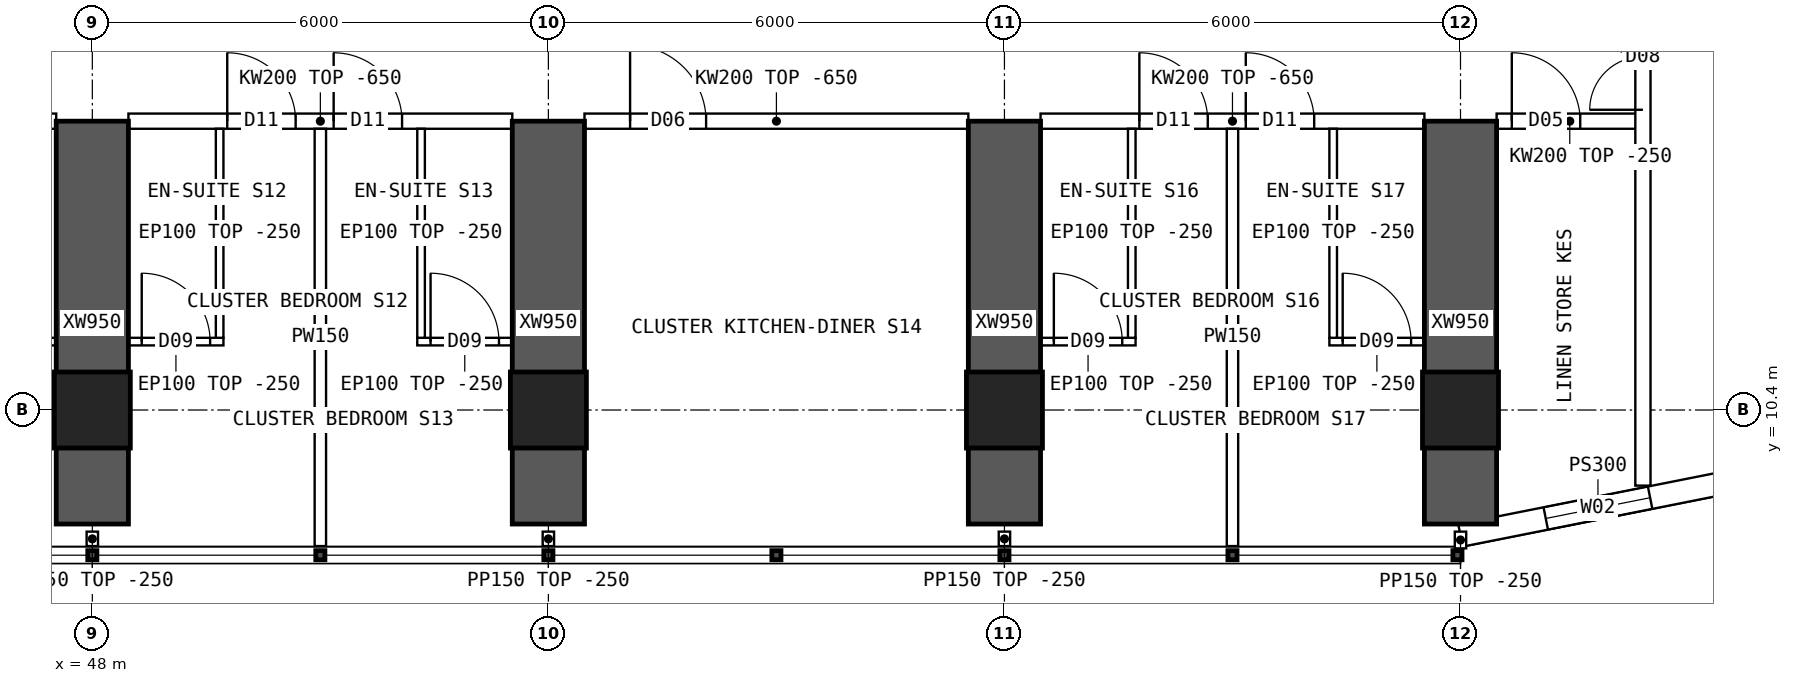
"""IFC4 building model, lengths in metres.
Left out: names, types, materials, properties, quantities, classifications, styles, units other than length and angle.
Written with IfcOpenShell. Run it as: python <this file> out.ifc"""

import sys

from ifc_helpers import new_model, si_unit, direction, frame, frame_2d, origin, origin_2d, place, context, subcontext, project, spatial, polyline, rectangle, hollow_rectangle, outline, extrude, element, fill, save


model = new_model("IFC4")
c1 = context("Model", 3, precision=1e-05, world=origin(), true_north=direction((0.0, 1.0)))
c2 = subcontext(c1, "Body", "Model", "MODEL_VIEW")
j1 = project(units=[si_unit("LENGTHUNIT", "METRE"), si_unit("PLANEANGLEUNIT", "RADIAN")], contexts=[c1])
p1 = place(None, origin())
s1 = spatial("IfcSite", under=j1, at=p1, CompositionType="ELEMENT")
p2 = place(p1, origin())
s2 = spatial("IfcBuilding", under=s1, at=p2, CompositionType="ELEMENT")
p3 = place(p2, frame((0.0, 0.0, 103.15)))
s3 = spatial("IfcBuildingStorey", under=s2, at=p3, CompositionType="ELEMENT", Elevation=103.15)
for number, where, z_axis, x_axis in (
    (1, (48.0, 10.4, 0.0), (0.0, 0.0, 1.0), (1.0, 0.0, 0.0)),
    (2, (54.0, 10.4, 0.0), (0.0, 0.0, 1.0), (1.0, 0.0, 0.0)),
    (3, (60.0, 10.4, 0.0), (0.0, 0.0, 1.0), (1.0, 0.0, 0.0)),
    (4, (66.0, 10.4, 0.0), (0.0, 0.0, 1.0), (1.0, 0.0, 0.0)),
):
    element("IfcColumn", number, at=place(p3, frame(where, z_axis=z_axis, x_axis=x_axis)), inside=s3, PredefinedType="COLUMN", context=c2, shape_type="SweptSolid", body=[
        extrude(hollow_rectangle(XDim=1.0, YDim=1.0, WallThickness=0.1, at=origin_2d()), origin(), (0.0, 0.0, 1.0), 3.75),
    ])
for number, where, z_axis, x_axis in (
    (5, (48.0, 8.9, 0.0), (0.0, 0.0, 1.0), (0.0, 1.0, 0.0)),
    (6, (54.0, 8.9, 0.0), (0.0, 0.0, 1.0), (0.0, 1.0, 0.0)),
    (7, (60.0, 8.9, 0.0), (0.0, 0.0, 1.0), (0.0, 1.0, 0.0)),
    (8, (66.0, 8.9, 0.0), (0.0, 0.0, 1.0), (0.0, 1.0, 0.0)),
):
    element("IfcWall", number, at=place(p3, frame(where, z_axis=z_axis, x_axis=x_axis)), inside=s3, PredefinedType="SHEAR", context=c2, shape_type="SweptSolid", body=[
        extrude(rectangle(XDim=5.3, YDim=0.95, at=frame_2d((2.65, 0.0))), origin(), (0.0, 0.0, 1.0), 3.75),
    ])
p4 = place(p3, frame((66.0, 8.75, 0.0), z_axis=(0.0, 0.0, 1.0), x_axis=(0.980791473772, 0.195059183267, 0.0)))
e9 = element("IfcWall", 9, at=p4, inside=s3, PredefinedType="SOLIDWALL", context=c2, shape_type="SweptSolid", body=[
    extrude(outline(polyline([(-0.03, -0.15), (3.717, -0.15), (3.657, 0.15), (0.03, 0.15), (-0.03, -0.15)])), origin(), (0.0, 0.0, 1.0), 3.5),
])
p5 = place(p4, frame((1.144, 0.0, 0.9)))
e10 = element("IfcOpeningElement", 10, at=p5, cuts=e9, PredefinedType="OPENING", context=c2, shape_type="SweptSolid", body=[
    extrude(rectangle(XDim=1.4, YDim=1.8, at=frame_2d((0.7, 0.9))), frame((0.0, 0.16, 0.0), z_axis=(0.0, -1.0, 0.0), x_axis=(1.0, 0.0, 0.0)), (0.0, 0.0, 1.0), 0.32),
])
p6 = place(p3, frame((42.475, 14.2, 0.0), z_axis=(0.0, 0.0, 1.0), x_axis=(1.0, 0.0, 0.0)))
e11 = element("IfcWall", 11, at=p6, inside=s3, PredefinedType="SOLIDWALL", context=c2, shape_type="SweptSolid", body=[
    extrude(outline(polyline([(0.0, 0.0), (5.05, 0.0), (5.05, 3.1), (0.0, 3.1), (0.0, 0.0)])), frame((0.0, 0.1, 0.0), z_axis=(0.0, -1.0, 0.0), x_axis=(1.0, 0.0, 0.0)), (0.0, 0.0, 1.0), 0.2),
])
p7 = place(p6, frame((1.3, 0.0, 0.0)))
e12 = element("IfcOpeningElement", 12, at=p7, cuts=e11, PredefinedType="OPENING", context=c2, shape_type="SweptSolid", body=[
    extrude(rectangle(XDim=0.9, YDim=2.1, at=frame_2d((0.45, 1.05))), frame((0.0, 0.11, 0.0), z_axis=(0.0, -1.0, 0.0), x_axis=(1.0, 0.0, 0.0)), (0.0, 0.0, 1.0), 0.22),
])
p8 = place(p6, frame((2.7, 0.0, 0.0)))
e13 = element("IfcOpeningElement", 13, at=p8, cuts=e11, PredefinedType="OPENING", context=c2, shape_type="SweptSolid", body=[
    extrude(rectangle(XDim=0.9, YDim=2.1, at=frame_2d((0.45, 1.05))), frame((0.0, 0.11, 0.0), z_axis=(0.0, -1.0, 0.0), x_axis=(1.0, 0.0, 0.0)), (0.0, 0.0, 1.0), 0.22),
])
p9 = place(p3, frame((48.475, 14.2, 0.0), z_axis=(0.0, 0.0, 1.0), x_axis=(1.0, 0.0, 0.0)))
e14 = element("IfcWall", 14, at=p9, inside=s3, PredefinedType="SOLIDWALL", context=c2, shape_type="SweptSolid", body=[
    extrude(outline(polyline([(0.0, 0.0), (5.05, 0.0), (5.05, 3.1), (0.0, 3.1), (0.0, 0.0)])), frame((0.0, 0.1, 0.0), z_axis=(0.0, -1.0, 0.0), x_axis=(1.0, 0.0, 0.0)), (0.0, 0.0, 1.0), 0.2),
])
p10 = place(p9, frame((1.3, 0.0, 0.0)))
e15 = element("IfcOpeningElement", 15, at=p10, cuts=e14, PredefinedType="OPENING", context=c2, shape_type="SweptSolid", body=[
    extrude(rectangle(XDim=0.9, YDim=2.1, at=frame_2d((0.45, 1.05))), frame((0.0, 0.11, 0.0), z_axis=(0.0, -1.0, 0.0), x_axis=(1.0, 0.0, 0.0)), (0.0, 0.0, 1.0), 0.22),
])
p11 = place(p9, frame((2.7, 0.0, 0.0)))
e16 = element("IfcOpeningElement", 16, at=p11, cuts=e14, PredefinedType="OPENING", context=c2, shape_type="SweptSolid", body=[
    extrude(rectangle(XDim=0.9, YDim=2.1, at=frame_2d((0.45, 1.05))), frame((0.0, 0.11, 0.0), z_axis=(0.0, -1.0, 0.0), x_axis=(1.0, 0.0, 0.0)), (0.0, 0.0, 1.0), 0.22),
])
p12 = place(p3, frame((54.475, 14.2, 0.0), z_axis=(0.0, 0.0, 1.0), x_axis=(1.0, 0.0, 0.0)))
e17 = element("IfcWall", 17, at=p12, inside=s3, PredefinedType="SOLIDWALL", context=c2, shape_type="SweptSolid", body=[
    extrude(outline(polyline([(0.0, 0.0), (5.05, 0.0), (5.05, 3.1), (0.0, 3.1), (0.0, 0.0)])), frame((0.0, 0.1, 0.0), z_axis=(0.0, -1.0, 0.0), x_axis=(1.0, 0.0, 0.0)), (0.0, 0.0, 1.0), 0.2),
])
p13 = place(p12, frame((0.6, 0.0, 0.0)))
e18 = element("IfcOpeningElement", 18, at=p13, cuts=e17, PredefinedType="OPENING", context=c2, shape_type="SweptSolid", body=[
    extrude(rectangle(XDim=1.0, YDim=2.1, at=frame_2d((0.5, 1.05))), frame((0.0, 0.11, 0.0), z_axis=(0.0, -1.0, 0.0), x_axis=(1.0, 0.0, 0.0)), (0.0, 0.0, 1.0), 0.22),
])
p14 = place(p3, frame((60.475, 14.2, 0.0), z_axis=(0.0, 0.0, 1.0), x_axis=(1.0, 0.0, 0.0)))
e19 = element("IfcWall", 19, at=p14, inside=s3, PredefinedType="SOLIDWALL", context=c2, shape_type="SweptSolid", body=[
    extrude(outline(polyline([(0.0, 0.0), (5.05, 0.0), (5.05, 3.1), (0.0, 3.1), (0.0, 0.0)])), frame((0.0, 0.1, 0.0), z_axis=(0.0, -1.0, 0.0), x_axis=(1.0, 0.0, 0.0)), (0.0, 0.0, 1.0), 0.2),
])
p15 = place(p14, frame((1.3, 0.0, 0.0)))
e20 = element("IfcOpeningElement", 20, at=p15, cuts=e19, PredefinedType="OPENING", context=c2, shape_type="SweptSolid", body=[
    extrude(rectangle(XDim=0.9, YDim=2.1, at=frame_2d((0.45, 1.05))), frame((0.0, 0.11, 0.0), z_axis=(0.0, -1.0, 0.0), x_axis=(1.0, 0.0, 0.0)), (0.0, 0.0, 1.0), 0.22),
])
p16 = place(p14, frame((2.7, 0.0, 0.0)))
e21 = element("IfcOpeningElement", 21, at=p16, cuts=e19, PredefinedType="OPENING", context=c2, shape_type="SweptSolid", body=[
    extrude(rectangle(XDim=0.9, YDim=2.1, at=frame_2d((0.45, 1.05))), frame((0.0, 0.11, 0.0), z_axis=(0.0, -1.0, 0.0), x_axis=(1.0, 0.0, 0.0)), (0.0, 0.0, 1.0), 0.22),
])
p17 = place(p3, frame((66.475, 14.2, 0.0), z_axis=(0.0, 0.0, 1.0), x_axis=(1.0, 0.0, 0.0)))
e22 = element("IfcWall", 22, at=p17, inside=s3, PredefinedType="SOLIDWALL", context=c2, shape_type="SweptSolid", body=[
    extrude(rectangle(XDim=1.925, YDim=0.2, at=frame_2d((0.962, 0.0))), origin(), (0.0, 0.0, 1.0), 3.5),
])
p18 = place(p17, frame((0.2, 0.0, 0.0)))
e23 = element("IfcOpeningElement", 23, at=p18, cuts=e22, PredefinedType="OPENING", context=c2, shape_type="SweptSolid", body=[
    extrude(rectangle(XDim=0.9, YDim=2.1, at=frame_2d((0.45, 1.05))), frame((0.0, 0.11, 0.0), z_axis=(0.0, -1.0, 0.0), x_axis=(1.0, 0.0, 0.0)), (0.0, 0.0, 1.0), 0.22),
])
p19 = place(p3, frame((47.525, 11.3, 0.0), z_axis=(0.0, 0.0, 1.0), x_axis=(-1.0, 0.0, 0.0)))
e24 = element("IfcWall", 24, at=p19, inside=s3, PredefinedType="PARTITIONING", context=c2, shape_type="SweptSolid", body=[
    extrude(rectangle(XDim=1.25, YDim=0.1, at=frame_2d((0.625, 0.0))), origin(), (0.0, 0.0, 1.0), 3.5),
])
p20 = place(p19, frame((0.175, 0.0, 0.0)))
e25 = element("IfcOpeningElement", 25, at=p20, cuts=e24, PredefinedType="OPENING", context=c2, shape_type="SweptSolid", body=[
    extrude(rectangle(XDim=0.9, YDim=2.1, at=frame_2d((0.45, 1.05))), frame((0.0, 0.06, 0.0), z_axis=(0.0, -1.0, 0.0), x_axis=(1.0, 0.0, 0.0)), (0.0, 0.0, 1.0), 0.12),
])
p21 = place(p3, frame((51.0, 8.61, 0.0), z_axis=(0.0, 0.0, 1.0), x_axis=(0.0, 1.0, 0.0)))
e26 = element("IfcWall", 26, at=p21, inside=s3, PredefinedType="PARTITIONING", context=c2, shape_type="SweptSolid", body=[
    extrude(outline(polyline([(0.0, 0.0), (5.49, 0.0), (5.49, 3.1), (5.442, 3.1), (5.44, 3.5), (1.992, 3.5), (1.99, 3.1), (1.592, 3.1), (1.59, 3.5), (0.0, 3.5), (0.0, 0.0)])), frame((0.0, 0.075, 0.0), z_axis=(0.0, -1.0, 0.0), x_axis=(1.0, 0.0, 0.0)), (0.0, 0.0, 1.0), 0.15),
])
p22 = place(p3, frame((49.725, 11.3, 0.0), z_axis=(0.0, 0.0, 1.0), x_axis=(-1.0, 0.0, 0.0)))
e27 = element("IfcWall", 27, at=p22, inside=s3, PredefinedType="PARTITIONING", context=c2, shape_type="SweptSolid", body=[
    extrude(rectangle(XDim=1.25, YDim=0.1, at=frame_2d((0.625, 0.0))), origin(), (0.0, 0.0, 1.0), 3.5),
])
p23 = place(p22, frame((0.175, 0.0, 0.0)))
e28 = element("IfcOpeningElement", 28, at=p23, cuts=e27, PredefinedType="OPENING", context=c2, shape_type="SweptSolid", body=[
    extrude(rectangle(XDim=0.9, YDim=2.1, at=frame_2d((0.45, 1.05))), frame((0.0, 0.06, 0.0), z_axis=(0.0, -1.0, 0.0), x_axis=(1.0, 0.0, 0.0)), (0.0, 0.0, 1.0), 0.12),
])
p24 = place(p3, frame((49.675, 11.35, 0.0), z_axis=(0.0, 0.0, 1.0), x_axis=(0.0, 1.0, 0.0)))
e29 = element("IfcWall", 29, at=p24, inside=s3, PredefinedType="PARTITIONING", context=c2, shape_type="SweptSolid", body=[
    extrude(outline(polyline([(0.0, 0.0), (2.75, 0.0), (2.75, 3.1), (2.702, 3.1), (2.7, 3.5), (0.0, 3.5), (0.0, 0.0)])), frame((0.0, 0.05, 0.0), z_axis=(0.0, -1.0, 0.0), x_axis=(1.0, 0.0, 0.0)), (0.0, 0.0, 1.0), 0.1),
])
p25 = place(p3, frame((53.525, 11.3, 0.0), z_axis=(0.0, 0.0, 1.0), x_axis=(-1.0, 0.0, 0.0)))
e30 = element("IfcWall", 30, at=p25, inside=s3, PredefinedType="PARTITIONING", context=c2, shape_type="SweptSolid", body=[
    extrude(rectangle(XDim=1.25, YDim=0.1, at=frame_2d((0.625, 0.0))), origin(), (0.0, 0.0, 1.0), 3.5),
])
p26 = place(p25, frame((0.175, 0.0, 0.0)))
e31 = element("IfcOpeningElement", 31, at=p26, cuts=e30, PredefinedType="OPENING", context=c2, shape_type="SweptSolid", body=[
    extrude(rectangle(XDim=0.9, YDim=2.1, at=frame_2d((0.45, 1.05))), frame((0.0, 0.06, 0.0), z_axis=(0.0, -1.0, 0.0), x_axis=(1.0, 0.0, 0.0)), (0.0, 0.0, 1.0), 0.12),
])
p27 = place(p3, frame((52.325, 11.35, 0.0), z_axis=(0.0, 0.0, 1.0), x_axis=(0.0, 1.0, 0.0)))
e32 = element("IfcWall", 32, at=p27, inside=s3, PredefinedType="PARTITIONING", context=c2, shape_type="SweptSolid", body=[
    extrude(outline(polyline([(0.0, 0.0), (2.75, 0.0), (2.75, 3.1), (2.702, 3.1), (2.7, 3.5), (0.0, 3.5), (0.0, 0.0)])), frame((0.0, 0.05, 0.0), z_axis=(0.0, -1.0, 0.0), x_axis=(1.0, 0.0, 0.0)), (0.0, 0.0, 1.0), 0.1),
])
p28 = place(p3, frame((63.0, 8.61, 0.0), z_axis=(0.0, 0.0, 1.0), x_axis=(0.0, 1.0, 0.0)))
e33 = element("IfcWall", 33, at=p28, inside=s3, PredefinedType="PARTITIONING", context=c2, shape_type="SweptSolid", body=[
    extrude(outline(polyline([(0.0, 0.0), (5.49, 0.0), (5.49, 3.1), (5.442, 3.1), (5.44, 3.5), (1.992, 3.5), (1.99, 3.1), (1.592, 3.1), (1.59, 3.5), (0.0, 3.5), (0.0, 0.0)])), frame((0.0, 0.075, 0.0), z_axis=(0.0, -1.0, 0.0), x_axis=(1.0, 0.0, 0.0)), (0.0, 0.0, 1.0), 0.15),
])
p29 = place(p3, frame((61.725, 11.3, 0.0), z_axis=(0.0, 0.0, 1.0), x_axis=(-1.0, 0.0, 0.0)))
e34 = element("IfcWall", 34, at=p29, inside=s3, PredefinedType="PARTITIONING", context=c2, shape_type="SweptSolid", body=[
    extrude(rectangle(XDim=1.25, YDim=0.1, at=frame_2d((0.625, 0.0))), origin(), (0.0, 0.0, 1.0), 3.5),
])
p30 = place(p29, frame((0.175, 0.0, 0.0)))
e35 = element("IfcOpeningElement", 35, at=p30, cuts=e34, PredefinedType="OPENING", context=c2, shape_type="SweptSolid", body=[
    extrude(rectangle(XDim=0.9, YDim=2.1, at=frame_2d((0.45, 1.05))), frame((0.0, 0.06, 0.0), z_axis=(0.0, -1.0, 0.0), x_axis=(1.0, 0.0, 0.0)), (0.0, 0.0, 1.0), 0.12),
])
p31 = place(p3, frame((61.675, 11.35, 0.0), z_axis=(0.0, 0.0, 1.0), x_axis=(0.0, 1.0, 0.0)))
e36 = element("IfcWall", 36, at=p31, inside=s3, PredefinedType="PARTITIONING", context=c2, shape_type="SweptSolid", body=[
    extrude(outline(polyline([(0.0, 0.0), (2.75, 0.0), (2.75, 3.1), (2.702, 3.1), (2.7, 3.5), (0.0, 3.5), (0.0, 0.0)])), frame((0.0, 0.05, 0.0), z_axis=(0.0, -1.0, 0.0), x_axis=(1.0, 0.0, 0.0)), (0.0, 0.0, 1.0), 0.1),
])
p32 = place(p3, frame((65.525, 11.3, 0.0), z_axis=(0.0, 0.0, 1.0), x_axis=(-1.0, 0.0, 0.0)))
e37 = element("IfcWall", 37, at=p32, inside=s3, PredefinedType="PARTITIONING", context=c2, shape_type="SweptSolid", body=[
    extrude(rectangle(XDim=1.25, YDim=0.1, at=frame_2d((0.625, 0.0))), origin(), (0.0, 0.0, 1.0), 3.5),
])
p33 = place(p32, frame((0.175, 0.0, 0.0)))
e38 = element("IfcOpeningElement", 38, at=p33, cuts=e37, PredefinedType="OPENING", context=c2, shape_type="SweptSolid", body=[
    extrude(rectangle(XDim=0.9, YDim=2.1, at=frame_2d((0.45, 1.05))), frame((0.0, 0.06, 0.0), z_axis=(0.0, -1.0, 0.0), x_axis=(1.0, 0.0, 0.0)), (0.0, 0.0, 1.0), 0.12),
])
p34 = place(p3, frame((64.325, 11.35, 0.0), z_axis=(0.0, 0.0, 1.0), x_axis=(0.0, 1.0, 0.0)))
e39 = element("IfcWall", 39, at=p34, inside=s3, PredefinedType="PARTITIONING", context=c2, shape_type="SweptSolid", body=[
    extrude(outline(polyline([(0.0, 0.0), (2.75, 0.0), (2.75, 3.1), (2.702, 3.1), (2.7, 3.5), (0.0, 3.5), (0.0, 0.0)])), frame((0.0, 0.05, 0.0), z_axis=(0.0, -1.0, 0.0), x_axis=(1.0, 0.0, 0.0)), (0.0, 0.0, 1.0), 0.1),
])
p35 = place(p3, frame((68.4, 9.405, 0.0), z_axis=(0.0, 0.0, 1.0), x_axis=(0.0, 1.0, 0.0)))
e40 = element("IfcWall", 40, at=p35, inside=s3, PredefinedType="SOLIDWALL", context=c2, shape_type="SweptSolid", body=[
    extrude(rectangle(XDim=45.189, YDim=0.2, at=frame_2d((22.595, 0.0))), origin(), (0.0, 0.0, 1.0), 3.5),
])
p36 = place(p35, frame((25.595, 0.0, 0.0)))
e41 = element("IfcOpeningElement", 41, at=p36, cuts=e40, PredefinedType="OPENING", context=c2, shape_type="SweptSolid", body=[
    extrude(rectangle(XDim=1.2, YDim=2.1, at=frame_2d((0.6, 1.05))), frame((0.0, 0.11, 0.0), z_axis=(0.0, -1.0, 0.0), x_axis=(1.0, 0.0, 0.0)), (0.0, 0.0, 1.0), 0.22),
])
p37 = place(p35, frame((4.945, 0.0, 0.0)))
e42 = element("IfcOpeningElement", 42, at=p37, cuts=e40, PredefinedType="OPENING", context=c2, shape_type="SweptSolid", body=[
    extrude(rectangle(XDim=1.4, YDim=2.1, at=frame_2d((0.7, 1.05))), frame((0.0, 0.11, 0.0), z_axis=(0.0, -1.0, 0.0), x_axis=(1.0, 0.0, 0.0)), (0.0, 0.0, 1.0), 0.22),
])
p38 = place(p35, frame((38.745, 0.0, 0.0)))
e43 = element("IfcOpeningElement", 43, at=p38, cuts=e40, PredefinedType="OPENING", context=c2, shape_type="SweptSolid", body=[
    extrude(rectangle(XDim=1.4, YDim=2.1, at=frame_2d((0.7, 1.05))), frame((0.0, 0.11, 0.0), z_axis=(0.0, -1.0, 0.0), x_axis=(1.0, 0.0, 0.0)), (0.0, 0.0, 1.0), 0.22),
])
for number, where, z_axis, x_axis in (
    (44, (48.0, 8.8, 0.0), (0.0, 0.0, 1.0), (0.0, -1.0, 0.0)),
    (45, (54.0, 8.8, 0.0), (0.0, 0.0, 1.0), (0.0, -1.0, 0.0)),
    (46, (60.0, 8.8, 0.0), (0.0, 0.0, 1.0), (0.0, -1.0, 0.0)),
):
    element("IfcWall", number, at=place(p3, frame(where, z_axis=z_axis, x_axis=x_axis)), inside=s3, PredefinedType="PARTITIONING", context=c2, shape_type="SweptSolid", body=[
        extrude(rectangle(XDim=0.19, YDim=0.15, at=frame_2d((0.095, 0.0))), origin(), (0.0, 0.0, 1.0), 3.5),
    ])
p39 = place(p3, frame((66.0, 8.8, 0.0), z_axis=(0.0, 0.0, 1.0), x_axis=(0.0, -1.0, 0.0)))
e47 = element("IfcWall", 47, at=p39, inside=s3, PredefinedType="PARTITIONING", context=c2, shape_type="SweptSolid", body=[
    extrude(rectangle(XDim=0.22, YDim=0.15, at=frame_2d((0.11, 0.0))), origin(), (0.0, 0.0, 1.0), 3.5),
])
p40 = place(p5, origin())
e48 = element("IfcWindow", 48, at=p40, inside=s3, PartitioningType="SINGLE_PANEL", PredefinedType="WINDOW", context=c2, shape_type="SweptSolid", body=[
    extrude(rectangle(XDim=1.4, YDim=1.8, at=frame_2d((0.7, 0.9))), frame((0.0, 0.03, 0.0), z_axis=(0.0, -1.0, 0.0), x_axis=(1.0, 0.0, 0.0)), (0.0, 0.0, 1.0), 0.06),
])
fill(e10, e48)
p41 = place(p23, origin())
e49 = element("IfcDoor", 49, at=p41, inside=s3, OperationType="SINGLE_SWING_RIGHT", PredefinedType="DOOR", context=c2, shape_type="SweptSolid", body=[
    extrude(rectangle(XDim=0.9, YDim=2.1, at=frame_2d((0.45, 1.05))), frame((0.0, 0.025, 0.0), z_axis=(0.0, -1.0, 0.0), x_axis=(1.0, 0.0, 0.0)), (0.0, 0.0, 1.0), 0.05),
])
fill(e28, e49)
p42 = place(p10, origin())
e50 = element("IfcDoor", 50, at=p42, inside=s3, OperationType="SINGLE_SWING_LEFT", PredefinedType="DOOR", context=c2, shape_type="SweptSolid", body=[
    extrude(rectangle(XDim=0.9, YDim=2.1, at=frame_2d((0.45, 1.05))), frame((0.0, 0.025, 0.0), z_axis=(0.0, -1.0, 0.0), x_axis=(1.0, 0.0, 0.0)), (0.0, 0.0, 1.0), 0.05),
])
fill(e15, e50)
p43 = place(p26, origin())
e51 = element("IfcDoor", 51, at=p43, inside=s3, OperationType="SINGLE_SWING_RIGHT", PredefinedType="DOOR", context=c2, shape_type="SweptSolid", body=[
    extrude(rectangle(XDim=0.9, YDim=2.1, at=frame_2d((0.45, 1.05))), frame((0.0, 0.025, 0.0), z_axis=(0.0, -1.0, 0.0), x_axis=(1.0, 0.0, 0.0)), (0.0, 0.0, 1.0), 0.05),
])
fill(e31, e51)
p44 = place(p11, origin())
e52 = element("IfcDoor", 52, at=p44, inside=s3, OperationType="SINGLE_SWING_LEFT", PredefinedType="DOOR", context=c2, shape_type="SweptSolid", body=[
    extrude(rectangle(XDim=0.9, YDim=2.1, at=frame_2d((0.45, 1.05))), frame((0.0, 0.025, 0.0), z_axis=(0.0, -1.0, 0.0), x_axis=(1.0, 0.0, 0.0)), (0.0, 0.0, 1.0), 0.05),
])
fill(e16, e52)
p45 = place(p13, origin())
e53 = element("IfcDoor", 53, at=p45, inside=s3, OperationType="SINGLE_SWING_LEFT", PredefinedType="DOOR", context=c2, shape_type="SweptSolid", body=[
    extrude(rectangle(XDim=1.0, YDim=2.1, at=frame_2d((0.5, 1.05))), frame((0.0, 0.025, 0.0), z_axis=(0.0, -1.0, 0.0), x_axis=(1.0, 0.0, 0.0)), (0.0, 0.0, 1.0), 0.05),
])
fill(e18, e53)
p46 = place(p30, origin())
e54 = element("IfcDoor", 54, at=p46, inside=s3, OperationType="SINGLE_SWING_RIGHT", PredefinedType="DOOR", context=c2, shape_type="SweptSolid", body=[
    extrude(rectangle(XDim=0.9, YDim=2.1, at=frame_2d((0.45, 1.05))), frame((0.0, 0.025, 0.0), z_axis=(0.0, -1.0, 0.0), x_axis=(1.0, 0.0, 0.0)), (0.0, 0.0, 1.0), 0.05),
])
fill(e35, e54)
p47 = place(p15, origin())
e55 = element("IfcDoor", 55, at=p47, inside=s3, OperationType="SINGLE_SWING_LEFT", PredefinedType="DOOR", context=c2, shape_type="SweptSolid", body=[
    extrude(rectangle(XDim=0.9, YDim=2.1, at=frame_2d((0.45, 1.05))), frame((0.0, 0.025, 0.0), z_axis=(0.0, -1.0, 0.0), x_axis=(1.0, 0.0, 0.0)), (0.0, 0.0, 1.0), 0.05),
])
fill(e20, e55)
p48 = place(p33, origin())
e56 = element("IfcDoor", 56, at=p48, inside=s3, OperationType="SINGLE_SWING_RIGHT", PredefinedType="DOOR", context=c2, shape_type="SweptSolid", body=[
    extrude(rectangle(XDim=0.9, YDim=2.1, at=frame_2d((0.45, 1.05))), frame((0.0, 0.025, 0.0), z_axis=(0.0, -1.0, 0.0), x_axis=(1.0, 0.0, 0.0)), (0.0, 0.0, 1.0), 0.05),
])
fill(e38, e56)
p49 = place(p16, origin())
e57 = element("IfcDoor", 57, at=p49, inside=s3, OperationType="SINGLE_SWING_LEFT", PredefinedType="DOOR", context=c2, shape_type="SweptSolid", body=[
    extrude(rectangle(XDim=0.9, YDim=2.1, at=frame_2d((0.45, 1.05))), frame((0.0, 0.025, 0.0), z_axis=(0.0, -1.0, 0.0), x_axis=(1.0, 0.0, 0.0)), (0.0, 0.0, 1.0), 0.05),
])
fill(e21, e57)
p50 = place(p37, origin())
e58 = element("IfcDoor", 58, at=p50, inside=s3, OperationType="DOUBLE_DOOR_SINGLE_SWING", PredefinedType="DOOR", context=c2, shape_type="SweptSolid", body=[
    extrude(rectangle(XDim=1.4, YDim=2.1, at=frame_2d((0.7, 1.05))), frame((0.0, 0.025, 0.0), z_axis=(0.0, -1.0, 0.0), x_axis=(1.0, 0.0, 0.0)), (0.0, 0.0, 1.0), 0.05),
])
fill(e42, e58)
p51 = place(p18, origin())
e59 = element("IfcDoor", 59, at=p51, inside=s3, OperationType="SINGLE_SWING_LEFT", PredefinedType="DOOR", context=c2, shape_type="SweptSolid", body=[
    extrude(rectangle(XDim=0.9, YDim=2.1, at=frame_2d((0.45, 1.05))), frame((0.0, 0.025, 0.0), z_axis=(0.0, -1.0, 0.0), x_axis=(1.0, 0.0, 0.0)), (0.0, 0.0, 1.0), 0.05),
])
fill(e23, e59)
save(model, sys.argv[1])
